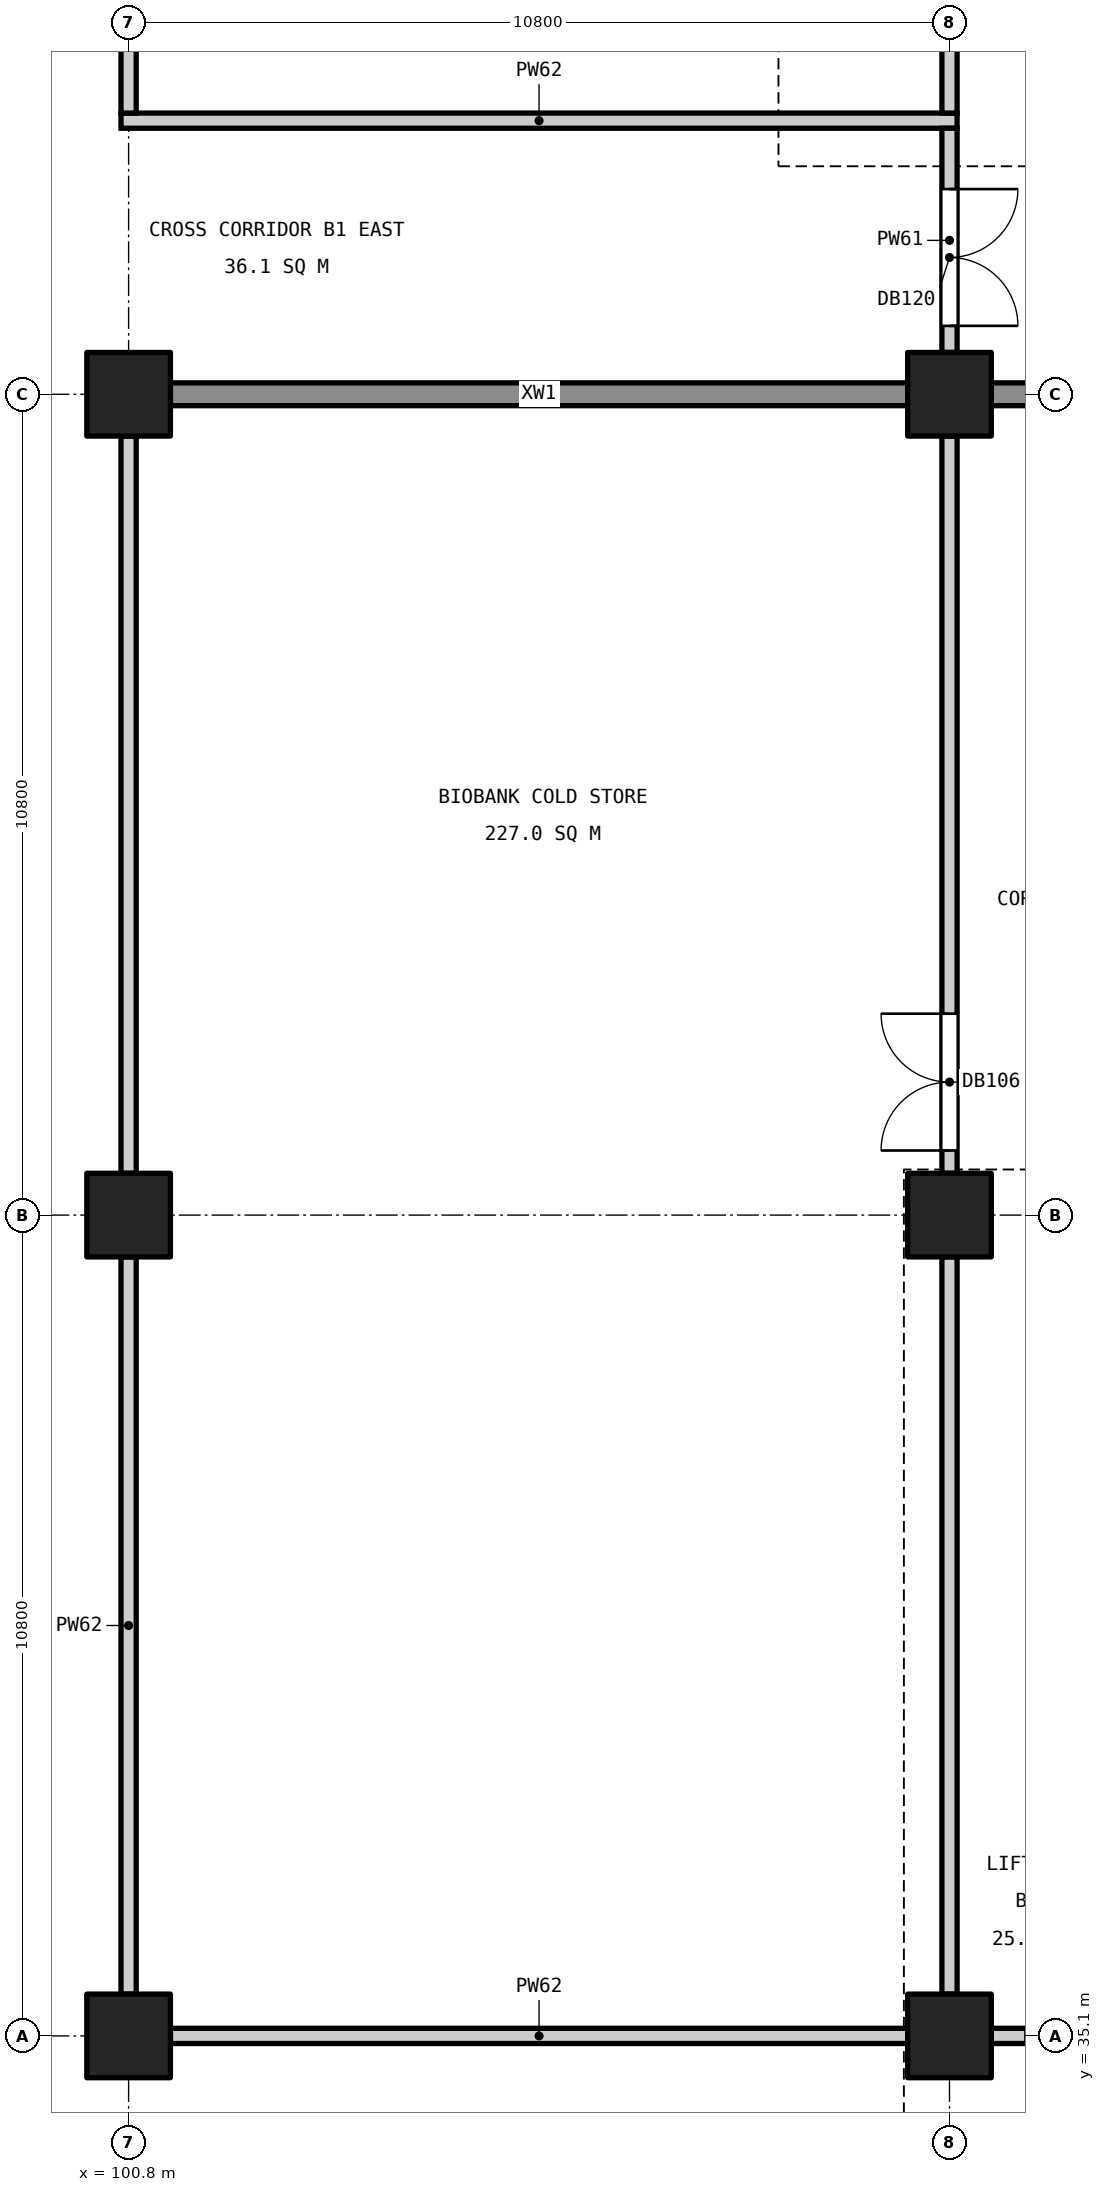
"""IFC4 building model, lengths in metres.
Left out: names, types, materials, properties, quantities, classifications, styles, units other than length and angle.
Written with IfcOpenShell. Run it as: python <this file> out.ifc"""

import sys

from ifc_helpers import new_model, si_unit, direction, frame, frame_2d, origin, origin_2d, place, context, subcontext, project, spatial, rectangle, extrude, element, fill, save


model = new_model("IFC4")
c1 = context("Model", 3, precision=1e-05, world=origin(), true_north=direction((0.0, 1.0)))
c2 = subcontext(c1, "Body", "Model", "MODEL_VIEW")
j1 = project(units=[si_unit("LENGTHUNIT", "METRE"), si_unit("PLANEANGLEUNIT", "RADIAN")], contexts=[c1])
p1 = place(None, origin())
s1 = spatial("IfcSite", under=j1, at=p1, CompositionType="ELEMENT")
p2 = place(p1, origin())
s2 = spatial("IfcBuilding", under=s1, at=p2, CompositionType="ELEMENT")
p3 = place(p2, frame((0.0, 0.0, -4.8)))
s3 = spatial("IfcBuildingStorey", under=s2, at=p3, CompositionType="ELEMENT", Elevation=-4.8)
for number, where, z_axis, x_axis in (
    (1, (111.6, 35.1, 0.0), (0.0, 0.0, 1.0), (1.0, 0.0, 0.0)),
    (2, (111.6, 45.9, 0.0), (0.0, 0.0, 1.0), (1.0, 0.0, 0.0)),
    (3, (111.6, 56.7, 0.0), (0.0, 0.0, 1.0), (1.0, 0.0, 0.0)),
    (4, (100.8, 35.1, 0.0), (0.0, 0.0, 1.0), (1.0, 0.0, 0.0)),
    (5, (100.8, 45.9, 0.0), (0.0, 0.0, 1.0), (1.0, 0.0, 0.0)),
    (6, (100.8, 56.7, 0.0), (0.0, 0.0, 1.0), (1.0, 0.0, 0.0)),
):
    element("IfcColumn", number, at=place(p3, frame(where, z_axis=z_axis, x_axis=x_axis)), inside=s3, PredefinedType="COLUMN", context=c2, shape_type="SweptSolid", body=[
        extrude(rectangle(XDim=1.1, YDim=1.1, at=origin_2d()), origin(), (0.0, 0.0, 1.0), 4.5),
    ])
p4 = place(p3, frame((118.25, 56.7, 0.0), z_axis=(0.0, 0.0, 1.0), x_axis=(-1.0, 0.0, 0.0)))
e7 = element("IfcWall", 7, at=p4, inside=s3, PredefinedType="SHEAR", context=c2, shape_type="SweptSolid", body=[
    extrude(rectangle(XDim=6.1, YDim=0.3, at=frame_2d((3.05, 0.0))), origin(), (0.0, 0.0, 1.0), 4.5),
])
p5 = place(p4, frame((2.15, 0.0, 0.0)))
e8 = element("IfcOpeningElement", 8, at=p5, cuts=e7, PredefinedType="OPENING", context=c2, shape_type="SweptSolid", body=[
    extrude(rectangle(XDim=1.8, YDim=2.1, at=frame_2d((0.9, 1.05))), frame((0.0, 0.16, 0.0), z_axis=(0.0, -1.0, 0.0), x_axis=(1.0, 0.0, 0.0)), (0.0, 0.0, 1.0), 0.32),
])
p6 = place(p3, frame((111.05, 56.7, 0.0), z_axis=(0.0, 0.0, 1.0), x_axis=(-1.0, 0.0, 0.0)))
e9 = element("IfcWall", 9, at=p6, inside=s3, PredefinedType="SHEAR", context=c2, shape_type="SweptSolid", body=[
    extrude(rectangle(XDim=9.7, YDim=0.3, at=frame_2d((4.85, 0.0))), origin(), (0.0, 0.0, 1.0), 4.5),
])
p7 = place(p3, frame((101.35, 35.1, 0.0), z_axis=(0.0, 0.0, 1.0), x_axis=(1.0, 0.0, 0.0)))
e10 = element("IfcWall", 10, at=p7, inside=s3, PredefinedType="PARTITIONING", context=c2, shape_type="SweptSolid", body=[
    extrude(rectangle(XDim=9.7, YDim=0.2, at=frame_2d((4.85, 0.0))), origin(), (0.0, 0.0, 1.0), 3.7),
])
p8 = place(p3, frame((112.15, 35.1, 0.0), z_axis=(0.0, 0.0, 1.0), x_axis=(1.0, 0.0, 0.0)))
e11 = element("IfcWall", 11, at=p8, inside=s3, PredefinedType="PARTITIONING", context=c2, shape_type="SweptSolid", body=[
    extrude(rectangle(XDim=1.9, YDim=0.2, at=frame_2d((0.95, 0.0))), origin(), (0.0, 0.0, 1.0), 3.7),
])
p9 = place(p8, frame((0.45, 0.0, 0.0)))
e12 = element("IfcOpeningElement", 12, at=p9, cuts=e11, PredefinedType="OPENING", context=c2, shape_type="SweptSolid", body=[
    extrude(rectangle(XDim=1.0, YDim=2.1, at=frame_2d((0.5, 1.05))), frame((0.0, 0.11, 0.0), z_axis=(0.0, -1.0, 0.0), x_axis=(1.0, 0.0, 0.0)), (0.0, 0.0, 1.0), 0.22),
])
p10 = place(p3, frame((100.7, 60.3, 0.0), z_axis=(0.0, 0.0, 1.0), x_axis=(1.0, 0.0, 0.0)))
e13 = element("IfcWall", 13, at=p10, inside=s3, PredefinedType="PARTITIONING", context=c2, shape_type="SweptSolid", body=[
    extrude(rectangle(XDim=11.0, YDim=0.2, at=frame_2d((5.5, 0.0))), origin(), (0.0, 0.0, 1.0), 3.7),
])
p11 = place(p3, frame((100.8, 35.65, 0.0), z_axis=(0.0, 0.0, 1.0), x_axis=(0.0, 1.0, 0.0)))
e14 = element("IfcWall", 14, at=p11, inside=s3, PredefinedType="PARTITIONING", context=c2, shape_type="SweptSolid", body=[
    extrude(rectangle(XDim=9.7, YDim=0.2, at=frame_2d((4.85, 0.0))), origin(), (0.0, 0.0, 1.0), 3.4),
])
p12 = place(p3, frame((100.8, 46.45, 0.0), z_axis=(0.0, 0.0, 1.0), x_axis=(0.0, 1.0, 0.0)))
e15 = element("IfcWall", 15, at=p12, inside=s3, PredefinedType="PARTITIONING", context=c2, shape_type="SweptSolid", body=[
    extrude(rectangle(XDim=9.7, YDim=0.2, at=frame_2d((4.85, 0.0))), origin(), (0.0, 0.0, 1.0), 3.4),
])
p13 = place(p3, frame((100.8, 60.4, 0.0), z_axis=(0.0, 0.0, 1.0), x_axis=(0.0, 1.0, 0.0)))
e16 = element("IfcWall", 16, at=p13, inside=s3, PredefinedType="PARTITIONING", context=c2, shape_type="SweptSolid", body=[
    extrude(rectangle(XDim=6.55, YDim=0.2, at=frame_2d((3.275, 0.0))), origin(), (0.0, 0.0, 1.0), 3.4),
])
p14 = place(p3, frame((111.6, 35.65, 0.0), z_axis=(0.0, 0.0, 1.0), x_axis=(0.0, 1.0, 0.0)))
e17 = element("IfcWall", 17, at=p14, inside=s3, PredefinedType="PARTITIONING", context=c2, shape_type="SweptSolid", body=[
    extrude(rectangle(XDim=9.7, YDim=0.2, at=frame_2d((4.85, 0.0))), origin(), (0.0, 0.0, 1.0), 3.4),
])
p15 = place(p3, frame((111.6, 46.45, 0.0), z_axis=(0.0, 0.0, 1.0), x_axis=(0.0, 1.0, 0.0)))
e18 = element("IfcWall", 18, at=p15, inside=s3, PredefinedType="PARTITIONING", context=c2, shape_type="SweptSolid", body=[
    extrude(rectangle(XDim=9.7, YDim=0.2, at=frame_2d((4.85, 0.0))), origin(), (0.0, 0.0, 1.0), 3.4),
])
p16 = place(p15, frame((0.3, 0.0, 0.0)))
e19 = element("IfcOpeningElement", 19, at=p16, cuts=e18, PredefinedType="OPENING", context=c2, shape_type="SweptSolid", body=[
    extrude(rectangle(XDim=1.8, YDim=2.1, at=frame_2d((0.9, 1.05))), frame((0.0, 0.11, 0.0), z_axis=(0.0, -1.0, 0.0), x_axis=(1.0, 0.0, 0.0)), (0.0, 0.0, 1.0), 0.22),
])
p17 = place(p3, frame((111.6, 57.25, 0.0), z_axis=(0.0, 0.0, 1.0), x_axis=(0.0, 1.0, 0.0)))
e20 = element("IfcWall", 20, at=p17, inside=s3, PredefinedType="PARTITIONING", context=c2, shape_type="SweptSolid", body=[
    extrude(rectangle(XDim=2.95, YDim=0.2, at=frame_2d((1.475, 0.0))), origin(), (0.0, 0.0, 1.0), 3.4),
])
p18 = place(p17, frame((0.35, 0.0, 0.0)))
e21 = element("IfcOpeningElement", 21, at=p18, cuts=e20, PredefinedType="OPENING", context=c2, shape_type="SweptSolid", body=[
    extrude(rectangle(XDim=1.8, YDim=2.1, at=frame_2d((0.9, 1.05))), frame((0.0, 0.11, 0.0), z_axis=(0.0, -1.0, 0.0), x_axis=(1.0, 0.0, 0.0)), (0.0, 0.0, 1.0), 0.22),
])
p19 = place(p3, frame((111.6, 60.4, 0.0), z_axis=(0.0, 0.0, 1.0), x_axis=(0.0, 1.0, 0.0)))
e22 = element("IfcWall", 22, at=p19, inside=s3, PredefinedType="PARTITIONING", context=c2, shape_type="SweptSolid", body=[
    extrude(rectangle(XDim=6.55, YDim=0.2, at=frame_2d((3.275, 0.0))), origin(), (0.0, 0.0, 1.0), 3.4),
])
p20 = place(p16, origin())
e23 = element("IfcDoor", 23, at=p20, inside=s3, OperationType="DOUBLE_DOOR_SINGLE_SWING", PredefinedType="DOOR", context=c2, shape_type="SweptSolid", body=[
    extrude(rectangle(XDim=1.8, YDim=2.1, at=frame_2d((0.9, 1.05))), frame((0.0, 0.025, 0.0), z_axis=(0.0, -1.0, 0.0), x_axis=(1.0, 0.0, 0.0)), (0.0, 0.0, 1.0), 0.05),
])
fill(e19, e23)
p21 = place(p9, frame((1.0, 0.0, 0.0), z_axis=(0.0, 0.0, 1.0), x_axis=(-1.0, 0.0, 0.0)))
e24 = element("IfcDoor", 24, at=p21, inside=s3, OperationType="SINGLE_SWING_LEFT", PredefinedType="DOOR", context=c2, shape_type="SweptSolid", body=[
    extrude(rectangle(XDim=1.0, YDim=2.1, at=frame_2d((0.5, 1.05))), frame((0.0, 0.025, 0.0), z_axis=(0.0, -1.0, 0.0), x_axis=(1.0, 0.0, 0.0)), (0.0, 0.0, 1.0), 0.05),
])
fill(e12, e24)
p22 = place(p18, frame((1.8, 0.0, 0.0), z_axis=(0.0, 0.0, 1.0), x_axis=(-1.0, 0.0, 0.0)))
e25 = element("IfcDoor", 25, at=p22, inside=s3, OperationType="DOUBLE_DOOR_SINGLE_SWING", PredefinedType="DOOR", context=c2, shape_type="SweptSolid", body=[
    extrude(rectangle(XDim=1.8, YDim=2.1, at=frame_2d((0.9, 1.05))), frame((0.0, 0.025, 0.0), z_axis=(0.0, -1.0, 0.0), x_axis=(1.0, 0.0, 0.0)), (0.0, 0.0, 1.0), 0.05),
])
fill(e21, e25)
save(model, sys.argv[1])
